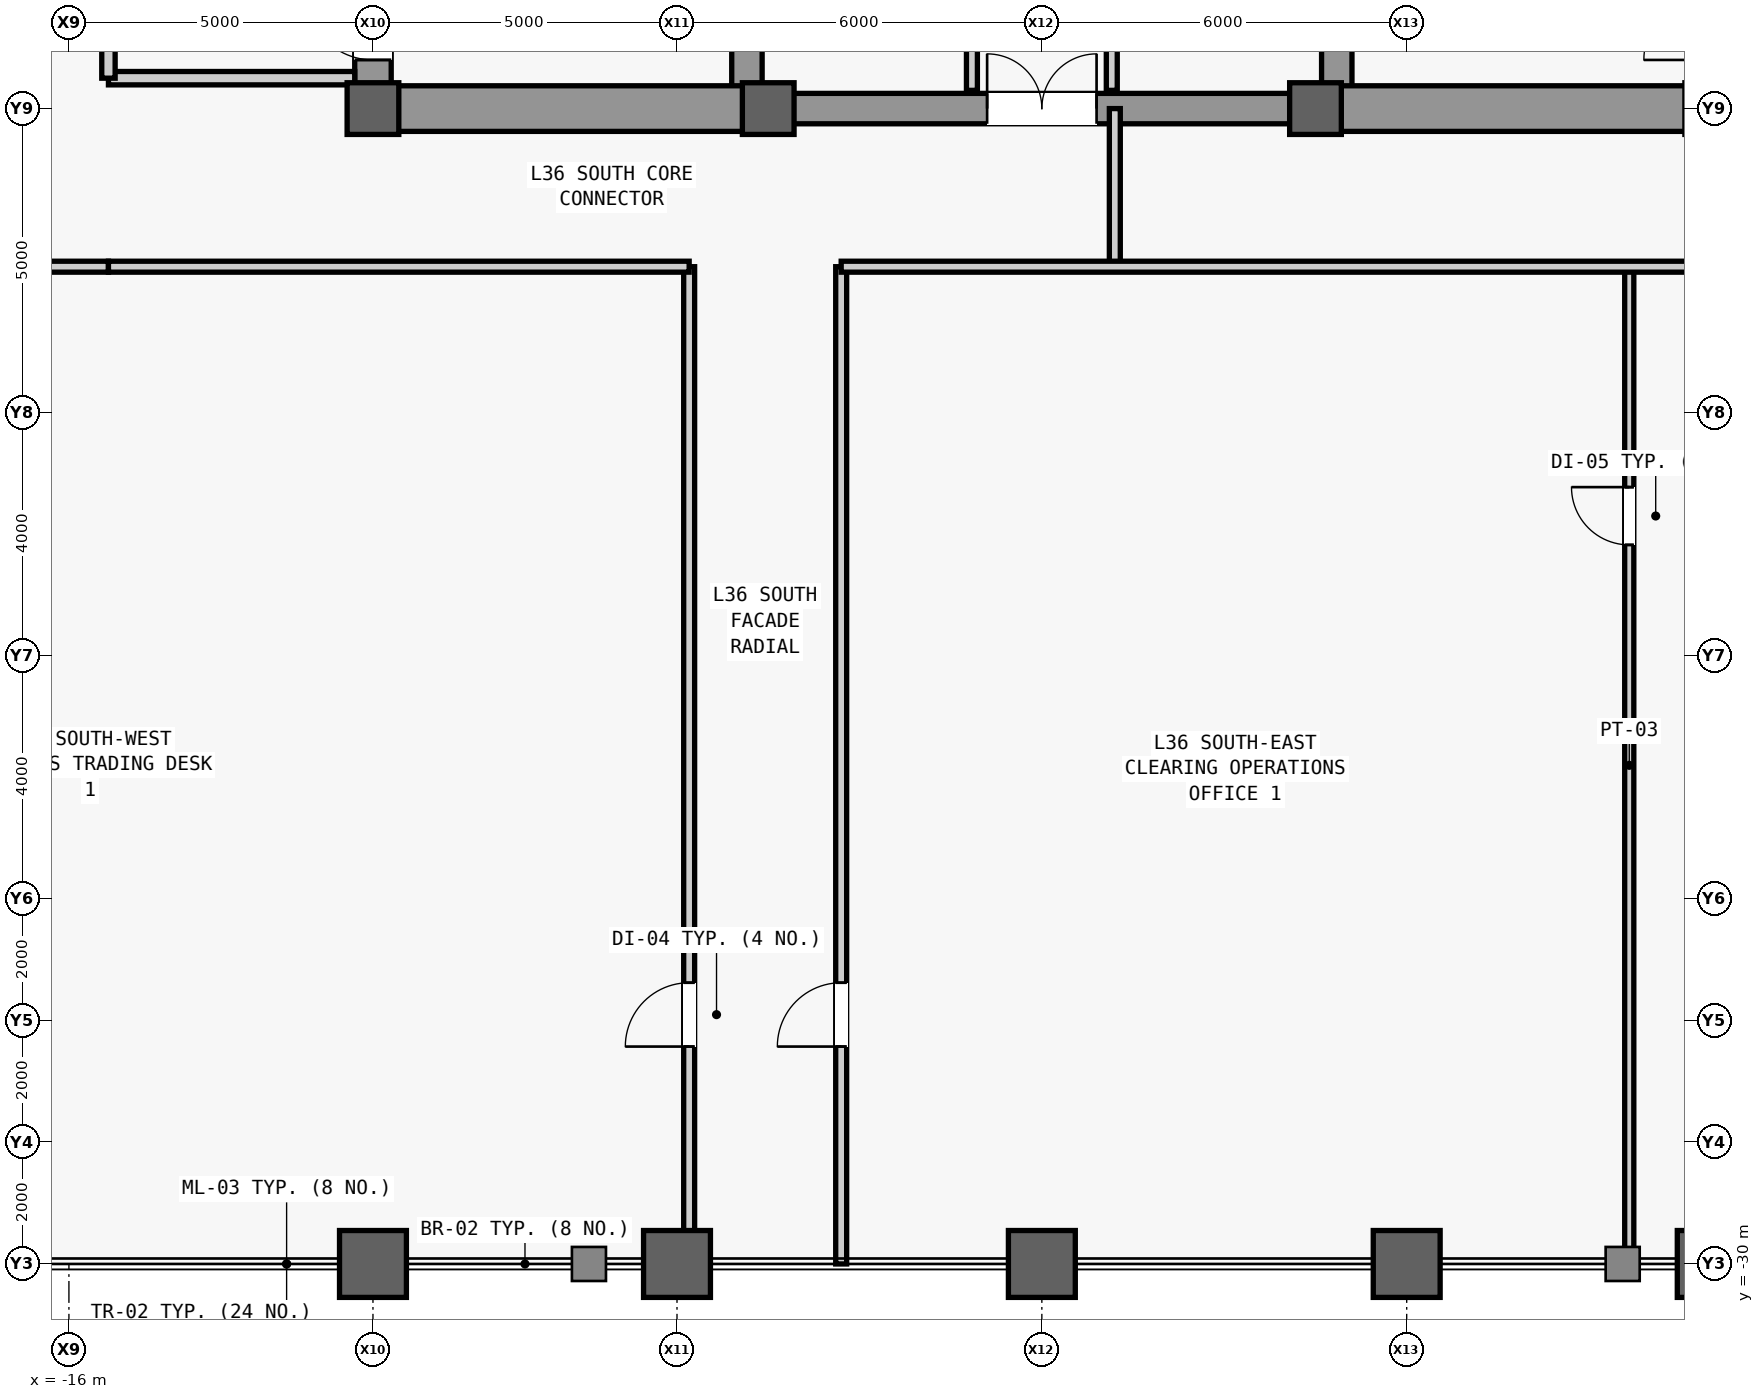
"""IFC4 building model, lengths in metres.
Left out: names, types, materials, properties, quantities, classifications, styles, units other than length and angle.
Written with IfcOpenShell. Run it as: python <this file> out.ifc"""

import sys

from ifc_helpers import new_model, si_unit, direction, frame, frame_2d, origin, origin_2d, place, context, subcontext, project, spatial, rectangle, hollow_rectangle, extrude, source, transform, mapped, element, fill, save


model = new_model("IFC4")
c1 = context("Model", 3, precision=1e-05, world=origin(), true_north=direction((0.0, 1.0)))
c2 = subcontext(c1, "Body", "Model", "MODEL_VIEW")
j1 = project(units=[si_unit("LENGTHUNIT", "METRE"), si_unit("PLANEANGLEUNIT", "RADIAN")], contexts=[c1])
p1 = place(None, origin())
s1 = spatial("IfcSite", under=j1, at=p1, CompositionType="ELEMENT")
p2 = place(p1, origin())
s2 = spatial("IfcBuilding", under=s1, at=p2, CompositionType="ELEMENT")
p3 = place(p2, frame((0.0, 0.0, 159.1)))
s3 = spatial("IfcBuildingStorey", under=s2, at=p3, CompositionType="ELEMENT", Elevation=159.1)
m1 = source(origin(), c2, "Body", "SweptSolid", [
    extrude(rectangle(XDim=22.0, YDim=0.6, at=frame_2d((11.0, 0.0))), origin(), (0.0, 0.0, 1.0), 3.78),
])
p4 = place(p3, frame((-11.0, -11.0, 0.0), z_axis=(0.0, 0.0, 1.0), x_axis=(0.0, 1.0, 0.0)))
e1 = element("IfcWall", 1, at=p4, inside=s3, PredefinedType="SHEAR", context=c2, shape_type="MappedRepresentation", body=[
    mapped(m1, transform((0.0, 0.0, 0.0), scale=1.0)),
])
m2 = source(origin(), c2, "Body", "SweptSolid", [
    extrude(rectangle(XDim=1.1, YDim=2.2, at=frame_2d((0.55, 1.1))), frame((0.0, 0.31, 0.0), z_axis=(0.0, -1.0, 0.0), x_axis=(1.0, 0.0, 0.0)), (0.0, 0.0, 1.0), 0.62),
])
p5 = place(p4, frame((0.8, 0.0, 0.0)))
e2 = element("IfcOpeningElement", 2, at=p5, cuts=e1, PredefinedType="OPENING", context=c2, shape_type="MappedRepresentation", body=[
    mapped(m2, transform((0.0, 0.0, 0.0), scale=1.0)),
])
p6 = place(p4, frame((12.5, 0.0, 0.0)))
e3 = element("IfcOpeningElement", 3, at=p6, cuts=e1, PredefinedType="OPENING", context=c2, shape_type="MappedRepresentation", body=[
    mapped(m2, transform((0.0, 0.0, 0.0), scale=1.0)),
])
m3 = source(origin(), c2, "Body", "SweptSolid", [
    extrude(rectangle(XDim=0.9, YDim=2.15, at=frame_2d((0.45, 1.075))), frame((0.0, 0.31, 0.0), z_axis=(0.0, -1.0, 0.0), x_axis=(1.0, 0.0, 0.0)), (0.0, 0.0, 1.0), 0.62),
])
p7 = place(p4, frame((7.575, 0.0, 0.0)))
e4 = element("IfcOpeningElement", 4, at=p7, cuts=e1, PredefinedType="OPENING", context=c2, shape_type="MappedRepresentation", body=[
    mapped(m3, transform((0.0, 0.0, 0.0), scale=1.0)),
])
m4 = source(origin(), c2, "Body", "SweptSolid", [
    extrude(rectangle(XDim=1.3, YDim=2.3, at=frame_2d((0.65, 1.15))), frame((0.0, 0.31, 0.0), z_axis=(0.0, -1.0, 0.0), x_axis=(1.0, 0.0, 0.0)), (0.0, 0.0, 1.0), 0.62),
])
p8 = place(p4, frame((2.7, 0.0, 0.0)))
e5 = element("IfcOpeningElement", 5, at=p8, cuts=e1, PredefinedType="OPENING", context=c2, shape_type="MappedRepresentation", body=[
    mapped(m4, transform((0.0, 0.0, 0.0), scale=1.0)),
])
m5 = source(origin(), c2, "Body", "SweptSolid", [
    extrude(rectangle(XDim=21.4, YDim=0.5, at=frame_2d((10.7, 0.0))), origin(), (0.0, 0.0, 1.0), 3.78),
])
for number, where, z_axis, x_axis in (
    (6, (-4.85, -10.7, 0.0), (0.0, 0.0, 1.0), (0.0, 1.0, 0.0)),
    (7, (4.85, -10.7, 0.0), (0.0, 0.0, 1.0), (0.0, 1.0, 0.0)),
):
    element("IfcWall", number, at=place(p3, frame(where, z_axis=z_axis, x_axis=x_axis)), inside=s3, PredefinedType="SHEAR", context=c2, shape_type="MappedRepresentation", body=[
        mapped(m5, transform((0.0, 0.0, 0.0), scale=1.0)),
    ])
m6 = source(origin(), c2, "Body", "SweptSolid", [
    extrude(rectangle(XDim=5.85, YDim=0.75, at=frame_2d((2.925, 0.0))), origin(), (0.0, 0.0, 1.0), 3.78),
])
for number, where, z_axis, x_axis in (
    (8, (-10.7, -11.0, 0.0), (0.0, 0.0, 1.0), (1.0, 0.0, 0.0)),
    (9, (4.85, -11.0, 0.0), (0.0, 0.0, 1.0), (1.0, 0.0, 0.0)),
):
    element("IfcWall", number, at=place(p3, frame(where, z_axis=z_axis, x_axis=x_axis)), inside=s3, PredefinedType="SHEAR", context=c2, shape_type="MappedRepresentation", body=[
        mapped(m6, transform((0.0, 0.0, 0.0), scale=1.0)),
    ])
m7 = source(origin(), c2, "Body", "SweptSolid", [
    extrude(rectangle(XDim=9.2, YDim=0.5, at=frame_2d((4.6, 0.0))), origin(), (0.0, 0.0, 1.0), 3.78),
])
p9 = place(p3, frame((-4.6, -11.0, 0.0), z_axis=(0.0, 0.0, 1.0), x_axis=(1.0, 0.0, 0.0)))
e10 = element("IfcWall", 10, at=p9, inside=s3, PredefinedType="SHEAR", context=c2, shape_type="MappedRepresentation", body=[
    mapped(m7, transform((0.0, 0.0, 0.0), scale=1.0)),
])
m8 = source(origin(), c2, "Body", "SweptSolid", [
    extrude(rectangle(XDim=1.8, YDim=2.25, at=frame_2d((0.9, 1.125))), frame((0.0, 0.26, 0.0), z_axis=(0.0, -1.0, 0.0), x_axis=(1.0, 0.0, 0.0)), (0.0, 0.0, 1.0), 0.52),
])
p10 = place(p9, frame((3.7, 0.0, 0.0)))
e11 = element("IfcOpeningElement", 11, at=p10, cuts=e10, PredefinedType="OPENING", context=c2, shape_type="MappedRepresentation", body=[
    mapped(m8, transform((0.0, 0.0, 0.0), scale=1.0)),
])
m9 = source(origin(), c2, "Body", "SweptSolid", [
    extrude(hollow_rectangle(XDim=1.1, YDim=1.1, WallThickness=0.06, at=origin_2d()), origin(), (0.0, 0.0, 1.0), 4.0),
])
p11 = place(p3, frame((-11.0, -30.0, 0.0), z_axis=(0.0, 0.0, 1.0), x_axis=(1.0, 0.0, 0.0)))
e12 = element("IfcColumn", 12, at=p11, inside=s3, PredefinedType="COLUMN", context=c2, shape_type="MappedRepresentation", body=[
    mapped(m9, transform((0.0, 0.0, 0.0), scale=1.0)),
])
m10 = source(origin(), c2, "Body", "SweptSolid", [
    extrude(rectangle(XDim=0.85, YDim=0.85, at=origin_2d()), origin(), (0.0, 0.0, 1.0), 4.0),
])
p12 = place(p3, frame((-11.0, -11.0, 0.0), z_axis=(0.0, 0.0, 1.0), x_axis=(1.0, 0.0, 0.0)))
e13 = element("IfcColumn", 13, at=p12, inside=s3, PredefinedType="COLUMN", context=c2, shape_type="MappedRepresentation", body=[
    mapped(m10, transform((0.0, 0.0, 0.0), scale=1.0)),
])
p13 = place(p3, frame((-6.0, -30.0, 0.0), z_axis=(0.0, 0.0, 1.0), x_axis=(1.0, 0.0, 0.0)))
e14 = element("IfcColumn", 14, at=p13, inside=s3, PredefinedType="COLUMN", context=c2, shape_type="MappedRepresentation", body=[
    mapped(m9, transform((0.0, 0.0, 0.0), scale=1.0)),
])
p14 = place(p3, frame((-4.5, -11.0, 0.0), z_axis=(0.0, 0.0, 1.0), x_axis=(1.0, 0.0, 0.0)))
e15 = element("IfcColumn", 15, at=p14, inside=s3, PredefinedType="COLUMN", context=c2, shape_type="MappedRepresentation", body=[
    mapped(m10, transform((0.0, 0.0, 0.0), scale=1.0)),
])
p15 = place(p3, frame((0.0, -30.0, 0.0), z_axis=(0.0, 0.0, 1.0), x_axis=(1.0, 0.0, 0.0)))
e16 = element("IfcColumn", 16, at=p15, inside=s3, PredefinedType="COLUMN", context=c2, shape_type="MappedRepresentation", body=[
    mapped(m9, transform((0.0, 0.0, 0.0), scale=1.0)),
])
p16 = place(p3, frame((4.5, -11.0, 0.0), z_axis=(0.0, 0.0, 1.0), x_axis=(1.0, 0.0, 0.0)))
e17 = element("IfcColumn", 17, at=p16, inside=s3, PredefinedType="COLUMN", context=c2, shape_type="MappedRepresentation", body=[
    mapped(m10, transform((0.0, 0.0, 0.0), scale=1.0)),
])
for number, where, z_axis, x_axis in (
    (18, (6.0, -30.0, 0.0), (0.0, 0.0, 1.0), (1.0, 0.0, 0.0)),
    (19, (11.0, -30.0, 0.0), (0.0, 0.0, 1.0), (1.0, 0.0, 0.0)),
):
    element("IfcColumn", number, at=place(p3, frame(where, z_axis=z_axis, x_axis=x_axis)), inside=s3, PredefinedType="COLUMN", context=c2, shape_type="MappedRepresentation", body=[
        mapped(m9, transform((0.0, 0.0, 0.0), scale=1.0)),
    ])
p17 = place(p3, frame((11.0, -11.0, 0.0), z_axis=(0.0, 0.0, 1.0), x_axis=(1.0, 0.0, 0.0)))
e20 = element("IfcColumn", 20, at=p17, inside=s3, PredefinedType="COLUMN", context=c2, shape_type="MappedRepresentation", body=[
    mapped(m10, transform((0.0, 0.0, 0.0), scale=1.0)),
])
m11 = source(origin(), c2, "Body", "SweptSolid", [
    extrude(rectangle(XDim=4.05, YDim=0.22, at=frame_2d((2.025, 0.0))), origin(), (0.0, 0.0, 1.0), 3.78),
])
p18 = place(p3, frame((-15.35, -10.5, 0.0), z_axis=(0.0, 0.0, 1.0), x_axis=(1.0, 0.0, 0.0)))
e21 = element("IfcWall", 21, at=p18, inside=s3, PredefinedType="PARTITIONING", context=c2, shape_type="MappedRepresentation", body=[
    mapped(m11, transform((0.0, 0.0, 0.0), scale=1.0)),
])
m12 = source(origin(), c2, "Body", "SweptSolid", [
    extrude(rectangle(XDim=4.4, YDim=0.22, at=frame_2d((2.2, 0.0))), origin(), (0.0, 0.0, 1.0), 3.78),
])
p19 = place(p3, frame((-15.35, -10.5, 0.0), z_axis=(0.0, 0.0, 1.0), x_axis=(0.0, 1.0, 0.0)))
e22 = element("IfcWall", 22, at=p19, inside=s3, PredefinedType="PARTITIONING", context=c2, shape_type="MappedRepresentation", body=[
    mapped(m12, transform((0.0, 0.0, 0.0), scale=1.0)),
])
m13 = source(origin(), c2, "Body", "SweptSolid", [
    extrude(rectangle(XDim=1.2, YDim=2.2, at=frame_2d((0.6, 1.1))), frame((0.0, 0.12, 0.0), z_axis=(0.0, -1.0, 0.0), x_axis=(1.0, 0.0, 0.0)), (0.0, 0.0, 1.0), 0.24),
])
p20 = place(p19, frame((1.6, 0.0, 0.0)))
e23 = element("IfcOpeningElement", 23, at=p20, cuts=e22, PredefinedType="OPENING", context=c2, shape_type="MappedRepresentation", body=[
    mapped(m13, transform((0.0, 0.0, 0.0), scale=1.0)),
])
m14 = source(origin(), c2, "Body", "SweptSolid", [
    extrude(rectangle(XDim=5.4, YDim=0.18, at=frame_2d((2.7, 0.0))), origin(), (0.0, 0.0, 1.0), 3.78),
])
p21 = place(p3, frame((-1.15, -10.7, 0.0), z_axis=(0.0, 0.0, 1.0), x_axis=(0.0, 1.0, 0.0)))
e24 = element("IfcWall", 24, at=p21, inside=s3, PredefinedType="PARTITIONING", context=c2, shape_type="MappedRepresentation", body=[
    mapped(m14, transform((0.0, 0.0, 0.0), scale=1.0)),
])
m15 = source(origin(), c2, "Body", "SweptSolid", [
    extrude(rectangle(XDim=0.9, YDim=2.15, at=frame_2d((0.45, 1.075))), frame((0.0, 0.1, 0.0), z_axis=(0.0, -1.0, 0.0), x_axis=(1.0, 0.0, 0.0)), (0.0, 0.0, 1.0), 0.2),
])
p22 = place(p21, frame((1.15, 0.0, 0.0)))
e25 = element("IfcOpeningElement", 25, at=p22, cuts=e24, PredefinedType="OPENING", context=c2, shape_type="MappedRepresentation", body=[
    mapped(m15, transform((0.0, 0.0, 0.0), scale=1.0)),
])
p23 = place(p21, frame((3.85, 0.0, 0.0)))
e26 = element("IfcOpeningElement", 26, at=p23, cuts=e24, PredefinedType="OPENING", context=c2, shape_type="MappedRepresentation", body=[
    mapped(m15, transform((0.0, 0.0, 0.0), scale=1.0)),
])
p24 = place(p3, frame((1.15, -10.7, 0.0), z_axis=(0.0, 0.0, 1.0), x_axis=(0.0, 1.0, 0.0)))
e27 = element("IfcWall", 27, at=p24, inside=s3, PredefinedType="PARTITIONING", context=c2, shape_type="MappedRepresentation", body=[
    mapped(m14, transform((0.0, 0.0, 0.0), scale=1.0)),
])
p25 = place(p24, frame((2.25, 0.0, 0.0)))
e28 = element("IfcOpeningElement", 28, at=p25, cuts=e27, PredefinedType="OPENING", context=c2, shape_type="MappedRepresentation", body=[
    mapped(m15, transform((0.0, 0.0, 0.0), scale=1.0)),
])
m16 = source(origin(), c2, "Body", "SweptSolid", [
    extrude(rectangle(XDim=2.45, YDim=0.18, at=frame_2d((1.225, 0.0))), origin(), (0.0, 0.0, 1.0), 3.78),
])
p26 = place(p3, frame((-17.8, -13.6, 0.0), z_axis=(0.0, 0.0, 1.0), x_axis=(1.0, 0.0, 0.0)))
e29 = element("IfcWall", 29, at=p26, inside=s3, PredefinedType="PARTITIONING", context=c2, shape_type="MappedRepresentation", body=[
    mapped(m16, transform((0.0, 0.0, 0.0), scale=1.0)),
])
m17 = source(origin(), c2, "Body", "SweptSolid", [
    extrude(rectangle(XDim=2.6, YDim=0.18, at=frame_2d((1.3, 0.0))), origin(), (0.0, 0.0, 1.0), 3.78),
])
p27 = place(p3, frame((1.2, -13.6, 0.0), z_axis=(0.0, 0.0, 1.0), x_axis=(0.0, 1.0, 0.0)))
e30 = element("IfcWall", 30, at=p27, inside=s3, PredefinedType="PARTITIONING", context=c2, shape_type="MappedRepresentation", body=[
    mapped(m17, transform((0.0, 0.0, 0.0), scale=1.0)),
])
m18 = source(origin(), c2, "Body", "SweptSolid", [
    extrude(rectangle(XDim=16.4, YDim=0.18, at=frame_2d((8.2, 0.0))), origin(), (0.0, 0.0, 1.0), 3.007),
])
p28 = place(p3, frame((-5.8, -30.0, 0.0), z_axis=(0.0, 0.0, 1.0), x_axis=(0.0, 1.0, 0.0)))
e31 = element("IfcWall", 31, at=p28, inside=s3, PredefinedType="PARTITIONING", context=c2, shape_type="MappedRepresentation", body=[
    mapped(m18, transform((0.0, 0.0, 0.0), scale=1.0)),
])
m19 = source(origin(), c2, "Body", "SweptSolid", [
    extrude(rectangle(XDim=1.05, YDim=2.2, at=frame_2d((0.525, 1.1))), frame((0.0, 0.1, 0.0), z_axis=(0.0, -1.0, 0.0), x_axis=(1.0, 0.0, 0.0)), (0.0, 0.0, 1.0), 0.2),
])
p29 = place(p28, frame((3.575, 0.0, 0.0)))
e32 = element("IfcOpeningElement", 32, at=p29, cuts=e31, PredefinedType="OPENING", context=c2, shape_type="MappedRepresentation", body=[
    mapped(m19, transform((0.0, 0.0, 0.0), scale=1.0)),
])
m20 = source(origin(), c2, "Body", "SweptSolid", [
    extrude(rectangle(XDim=9.55, YDim=0.18, at=frame_2d((4.775, 0.0))), origin(), (0.0, 0.0, 1.0), 3.78),
])
p30 = place(p3, frame((-15.35, -13.6, 0.0), z_axis=(0.0, 0.0, 1.0), x_axis=(1.0, 0.0, 0.0)))
e33 = element("IfcWall", 33, at=p30, inside=s3, PredefinedType="PARTITIONING", context=c2, shape_type="MappedRepresentation", body=[
    mapped(m20, transform((0.0, 0.0, 0.0), scale=1.0)),
])
m21 = source(origin(), c2, "Body", "SweptSolid", [
    extrude(rectangle(XDim=16.4, YDim=0.15, at=frame_2d((8.2, 0.0))), origin(), (0.0, 0.0, 1.0), 3.78),
])
p31 = place(p3, frame((9.66, -30.0, 0.0), z_axis=(0.0, 0.0, 1.0), x_axis=(0.0, 1.0, 0.0)))
e34 = element("IfcWall", 34, at=p31, inside=s3, PredefinedType="PARTITIONING", context=c2, shape_type="MappedRepresentation", body=[
    mapped(m21, transform((0.0, 0.0, 0.0), scale=1.0)),
])
m22 = source(origin(), c2, "Body", "SweptSolid", [
    extrude(rectangle(XDim=0.95, YDim=2.15, at=frame_2d((0.475, 1.075))), frame((0.0, 0.085, 0.0), z_axis=(0.0, -1.0, 0.0), x_axis=(1.0, 0.0, 0.0)), (0.0, 0.0, 1.0), 0.17),
])
p32 = place(p31, frame((11.825, 0.0, 0.0)))
e35 = element("IfcOpeningElement", 35, at=p32, cuts=e34, PredefinedType="OPENING", context=c2, shape_type="MappedRepresentation", body=[
    mapped(m22, transform((0.0, 0.0, 0.0), scale=1.0)),
])
m23 = source(origin(), c2, "Body", "SweptSolid", [
    extrude(rectangle(XDim=16.4, YDim=0.18, at=frame_2d((8.2, 0.0))), origin(), (0.0, 0.0, 1.0), 3.78),
])
p33 = place(p3, frame((-3.3, -30.0, 0.0), z_axis=(0.0, 0.0, 1.0), x_axis=(0.0, 1.0, 0.0)))
e36 = element("IfcWall", 36, at=p33, inside=s3, PredefinedType="PARTITIONING", context=c2, shape_type="MappedRepresentation", body=[
    mapped(m23, transform((0.0, 0.0, 0.0), scale=1.0)),
])
p34 = place(p33, frame((3.575, 0.0, 0.0)))
e37 = element("IfcOpeningElement", 37, at=p34, cuts=e36, PredefinedType="OPENING", context=c2, shape_type="MappedRepresentation", body=[
    mapped(m19, transform((0.0, 0.0, 0.0), scale=1.0)),
])
m24 = source(origin(), c2, "Body", "SweptSolid", [
    extrude(rectangle(XDim=18.65, YDim=0.18, at=frame_2d((9.325, 0.0))), origin(), (0.0, 0.0, 1.0), 3.78),
])
p35 = place(p3, frame((-3.3, -13.6, 0.0), z_axis=(0.0, 0.0, 1.0), x_axis=(1.0, 0.0, 0.0)))
e38 = element("IfcWall", 38, at=p35, inside=s3, PredefinedType="PARTITIONING", context=c2, shape_type="MappedRepresentation", body=[
    mapped(m24, transform((0.0, 0.0, 0.0), scale=1.0)),
])
m25 = source(origin(), c2, "Body", "SweptSolid", [
    extrude(rectangle(XDim=1.1, YDim=2.2, at=frame_2d((0.55, 1.1))), frame((0.0, 0.025, 0.0), z_axis=(0.0, -1.0, 0.0), x_axis=(1.0, 0.0, 0.0)), (0.0, 0.0, 1.0), 0.05),
])
p36 = place(p5, origin())
e39 = element("IfcDoor", 39, at=p36, inside=s3, OperationType="SINGLE_SWING_RIGHT", PredefinedType="DOOR", context=c2, shape_type="MappedRepresentation", body=[
    mapped(m25, transform((0.0, 0.0, 0.0), scale=1.0)),
])
fill(e2, e39)
m26 = source(origin(), c2, "Body", "SweptSolid", [
    extrude(rectangle(XDim=1.8, YDim=2.25, at=frame_2d((0.9, 1.125))), frame((0.0, 0.025, 0.0), z_axis=(0.0, -1.0, 0.0), x_axis=(1.0, 0.0, 0.0)), (0.0, 0.0, 1.0), 0.05),
])
p37 = place(p10, origin())
e40 = element("IfcDoor", 40, at=p37, inside=s3, OperationType="SINGLE_SWING_LEFT", PredefinedType="DOOR", context=c2, shape_type="MappedRepresentation", body=[
    mapped(m26, transform((0.0, 0.0, 0.0), scale=1.0)),
])
fill(e11, e40)
m27 = source(origin(), c2, "Body", "SweptSolid", [
    extrude(rectangle(XDim=1.05, YDim=2.2, at=frame_2d((0.525, 1.1))), frame((0.0, 0.025, 0.0), z_axis=(0.0, -1.0, 0.0), x_axis=(1.0, 0.0, 0.0)), (0.0, 0.0, 1.0), 0.05),
])
p38 = place(p29, origin())
e41 = element("IfcDoor", 41, at=p38, inside=s3, OperationType="SINGLE_SWING_LEFT", PredefinedType="DOOR", context=c2, shape_type="MappedRepresentation", body=[
    mapped(m27, transform((0.0, 0.0, 0.0), scale=1.0)),
])
fill(e32, e41)
m28 = source(origin(), c2, "Body", "SweptSolid", [
    extrude(rectangle(XDim=0.95, YDim=2.15, at=frame_2d((0.475, 1.075))), frame((0.0, 0.025, 0.0), z_axis=(0.0, -1.0, 0.0), x_axis=(1.0, 0.0, 0.0)), (0.0, 0.0, 1.0), 0.05),
])
p39 = place(p32, origin())
e42 = element("IfcDoor", 42, at=p39, inside=s3, OperationType="SINGLE_SWING_RIGHT", PredefinedType="DOOR", context=c2, shape_type="MappedRepresentation", body=[
    mapped(m28, transform((0.0, 0.0, 0.0), scale=1.0)),
])
fill(e35, e42)
p40 = place(p34, origin())
e43 = element("IfcDoor", 43, at=p40, inside=s3, OperationType="SINGLE_SWING_LEFT", PredefinedType="DOOR", context=c2, shape_type="MappedRepresentation", body=[
    mapped(m27, transform((0.0, 0.0, 0.0), scale=1.0)),
])
fill(e37, e43)
save(model, sys.argv[1])
